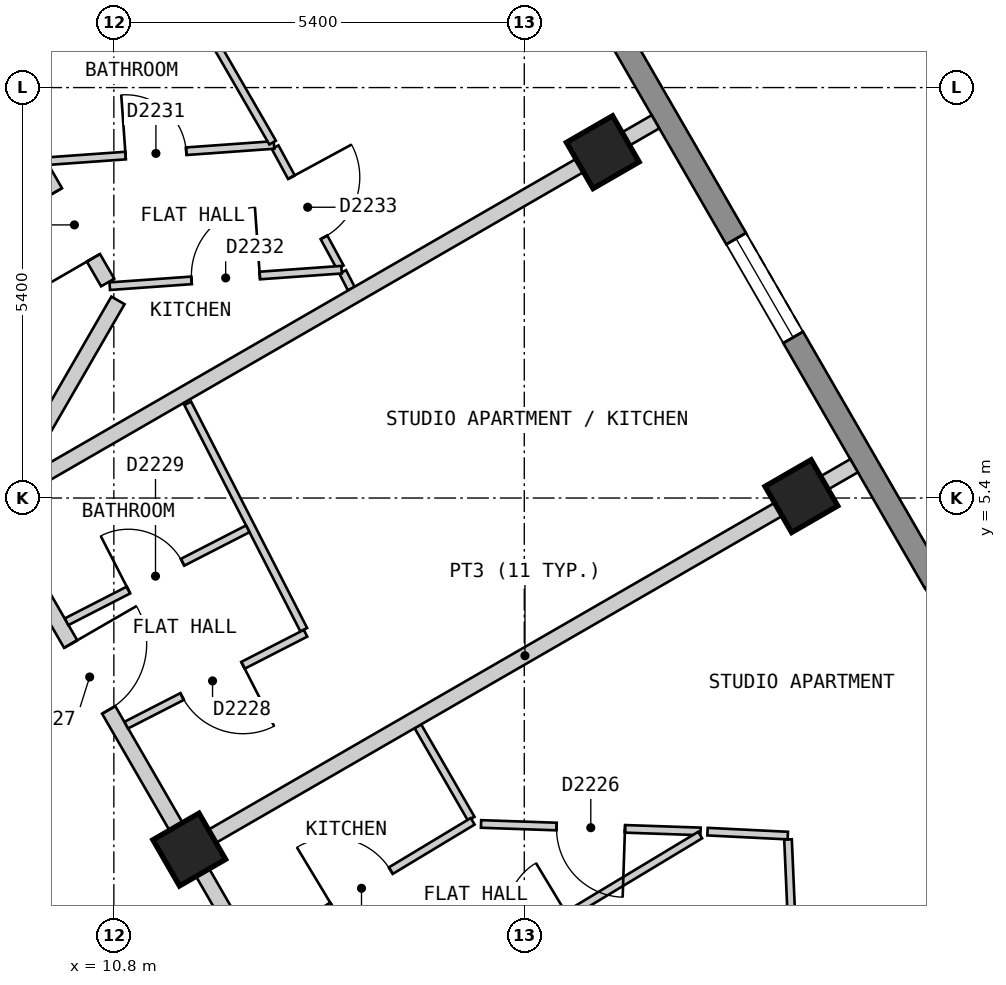
"""IFC4 building model, lengths in metres.
Left out: names, types, materials, properties, quantities, classifications, styles, units other than length and angle.
Written with IfcOpenShell. Run it as: python <this file> out.ifc"""

import sys

from ifc_helpers import new_model, si_unit, direction, frame, frame_2d, origin, origin_2d, place, context, subcontext, project, spatial, polyline, rectangle, outline, extrude, element, fill, save


model = new_model("IFC4")
c1 = context("Model", 3, precision=1e-05, world=origin(), true_north=direction((0.0, 1.0)))
c2 = subcontext(c1, "Body", "Model", "MODEL_VIEW")
j1 = project(units=[si_unit("LENGTHUNIT", "METRE"), si_unit("PLANEANGLEUNIT", "RADIAN")], contexts=[c1])
p1 = place(None, origin())
s1 = spatial("IfcSite", under=j1, at=p1, CompositionType="ELEMENT")
p2 = place(p1, origin())
s2 = spatial("IfcBuilding", under=s1, at=p2, CompositionType="ELEMENT")
p3 = place(p2, frame((0.0, 0.0, 235.8)))
s3 = spatial("IfcBuildingStorey", under=s2, at=p3, CompositionType="ELEMENT", Elevation=235.8)
for number, where, z_axis, x_axis in (
    (1, (19.846, 5.425, 0.0), (0.0, 0.0, 1.0), (-0.5, 0.866, 0.0)),
    (2, (17.233, 9.95, 0.0), (0.0, 0.0, 1.0), (-0.5, 0.866, 0.0)),
    (3, (11.792, 0.775, 0.0), (0.0, 0.0, 1.0), (-0.5, 0.866, 0.0)),
):
    element("IfcColumn", number, at=place(p3, frame(where, z_axis=z_axis, x_axis=x_axis)), inside=s3, PredefinedType="COLUMN", context=c2, shape_type="SweptSolid", body=[
        extrude(rectangle(XDim=0.7, YDim=0.7, at=origin_2d()), origin(), (0.0, 0.0, 1.0), 3.0),
    ])
p4 = place(p3, frame((23.599, 0.825, 0.0), z_axis=(0.0, 0.0, 1.0), x_axis=(-0.500003656944, 0.866023292436, 0.0)))
e4 = element("IfcWall", 4, at=p4, inside=s3, PredefinedType="SOLIDWALL", context=c2, shape_type="SweptSolid", body=[
    extrude(outline(polyline([(0.0, -0.15), (22.17, -0.15), (22.09, 0.15), (0.08, 0.15), (0.0, -0.15)])), origin(), (0.0, 0.0, 1.0), 2.7),
])
p5 = place(p4, frame((2.497, 0.0, 0.15)))
e5 = element("IfcOpeningElement", 5, at=p5, cuts=e4, PredefinedType="OPENING", context=c2, shape_type="SweptSolid", body=[
    extrude(rectangle(XDim=1.5, YDim=2.1, at=frame_2d((0.75, 1.05))), frame((0.0, 0.16, 0.0), z_axis=(0.0, -1.0, 0.0), x_axis=(1.0, 0.0, 0.0)), (0.0, 0.0, 1.0), 0.32),
])
p6 = place(p4, frame((7.723, 0.0, 0.15)))
e6 = element("IfcOpeningElement", 6, at=p6, cuts=e4, PredefinedType="OPENING", context=c2, shape_type="SweptSolid", body=[
    extrude(rectangle(XDim=1.5, YDim=2.1, at=frame_2d((0.75, 1.05))), frame((0.0, 0.16, 0.0), z_axis=(0.0, -1.0, 0.0), x_axis=(1.0, 0.0, 0.0)), (0.0, 0.0, 1.0), 0.32),
])
p7 = place(p4, frame((12.948, 0.0, 0.15)))
e7 = element("IfcOpeningElement", 7, at=p7, cuts=e4, PredefinedType="OPENING", context=c2, shape_type="SweptSolid", body=[
    extrude(rectangle(XDim=1.5, YDim=2.1, at=frame_2d((0.75, 1.05))), frame((0.0, 0.16, 0.0), z_axis=(0.0, -1.0, 0.0), x_axis=(1.0, 0.0, 0.0)), (0.0, 0.0, 1.0), 0.32),
])
p8 = place(p4, frame((18.173, 0.0, 0.15)))
e8 = element("IfcOpeningElement", 8, at=p8, cuts=e4, PredefinedType="OPENING", context=c2, shape_type="SweptSolid", body=[
    extrude(rectangle(XDim=1.5, YDim=2.1, at=frame_2d((0.75, 1.05))), frame((0.0, 0.16, 0.0), z_axis=(0.0, -1.0, 0.0), x_axis=(1.0, 0.0, 0.0)), (0.0, 0.0, 1.0), 0.32),
])
p9 = place(p3, frame((9.238, 5.2, 0.0), z_axis=(0.0, 0.0, 1.0), x_axis=(0.500025705601, -0.86601056214, 0.0)))
e9 = element("IfcWall", 9, at=p9, inside=s3, PredefinedType="PARTITIONING", context=c2, shape_type="SweptSolid", body=[
    extrude(rectangle(XDim=7.735, YDim=0.2, at=frame_2d((3.868, 0.0))), origin(), (0.0, 0.0, 1.0), 2.7),
])
p10 = place(p9, frame((6.898, 0.0, 0.0)))
e10 = element("IfcOpeningElement", 10, at=p10, cuts=e9, PredefinedType="OPENING", context=c2, shape_type="SweptSolid", body=[
    extrude(rectangle(XDim=0.8, YDim=2.1, at=frame_2d((0.4, 1.05))), frame((0.0, 0.11, 0.0), z_axis=(0.0, -1.0, 0.0), x_axis=(1.0, 0.0, 0.0)), (0.0, 0.0, 1.0), 0.22),
])
p11 = place(p9, frame((1.988, 0.0, 0.0)))
e11 = element("IfcOpeningElement", 11, at=p11, cuts=e9, PredefinedType="OPENING", context=c2, shape_type="SweptSolid", body=[
    extrude(rectangle(XDim=1.0, YDim=2.1, at=frame_2d((0.5, 1.05))), frame((0.0, 0.11, 0.0), z_axis=(0.0, -1.0, 0.0), x_axis=(1.0, 0.0, 0.0)), (0.0, 0.0, 1.0), 0.22),
])
p12 = place(p3, frame((5.485, 17.3, 0.0), z_axis=(0.0, 0.0, 1.0), x_axis=(0.500017221754, -0.866015460572, 0.0)))
e12 = element("IfcWall", 12, at=p12, inside=s3, PredefinedType="PARTITIONING", context=c2, shape_type="SweptSolid", body=[
    extrude(rectangle(XDim=10.468, YDim=0.2, at=frame_2d((5.234, 0.0))), origin(), (0.0, 0.0, 1.0), 2.7),
])
p13 = place(p12, frame((9.092, 0.0, 0.0)))
e13 = element("IfcOpeningElement", 13, at=p13, cuts=e12, PredefinedType="OPENING", context=c2, shape_type="SweptSolid", body=[
    extrude(rectangle(XDim=1.0, YDim=2.1, at=frame_2d((0.5, 1.05))), frame((0.0, 0.11, 0.0), z_axis=(0.0, -1.0, 0.0), x_axis=(1.0, 0.0, 0.0)), (0.0, 0.0, 1.0), 0.22),
])
p14 = place(p3, frame((9.354, 5.401, 0.0), z_axis=(0.0, 0.0, 1.0), x_axis=(0.499849222119, 0.866112437936, 0.0)))
e14 = element("IfcWall", 14, at=p14, inside=s3, PredefinedType="PARTITIONING", context=c2, shape_type="SweptSolid", body=[
    extrude(rectangle(XDim=3.001, YDim=0.2, at=frame_2d((1.5, 0.0))), origin(), (0.0, 0.0, 1.0), 2.7),
])
p15 = place(p3, frame((14.8, 2.397, 0.0), z_axis=(0.0, 0.0, 1.0), x_axis=(0.49989805765, -0.866084252228, 0.0)))
e15 = element("IfcWall", 15, at=p15, inside=s3, PredefinedType="PARTITIONING", context=c2, shape_type="SweptSolid", body=[
    extrude(rectangle(XDim=1.404, YDim=0.1, at=frame_2d((0.702, 0.0))), origin(), (0.0, 0.0, 1.0), 2.7),
])
p16 = place(p3, frame((12.922, 10.016, 0.0), z_axis=(0.0, 0.0, 1.0), x_axis=(0.476510550025, -0.879168752695, 0.0)))
e16 = element("IfcWall", 16, at=p16, inside=s3, PredefinedType="PARTITIONING", context=c2, shape_type="SweptSolid", body=[
    extrude(rectangle(XDim=1.798, YDim=0.1, at=frame_2d((0.899, 0.0))), origin(), (0.0, 0.0, 1.0), 2.7),
])
p17 = place(p16, frame((0.449, 0.0, 0.0)))
e17 = element("IfcOpeningElement", 17, at=p17, cuts=e16, PredefinedType="OPENING", context=c2, shape_type="SweptSolid", body=[
    extrude(rectangle(XDim=0.9, YDim=2.1, at=frame_2d((0.45, 1.05))), frame((0.0, 0.06, 0.0), z_axis=(0.0, -1.0, 0.0), x_axis=(1.0, 0.0, 0.0)), (0.0, 0.0, 1.0), 0.12),
])
p18 = place(p3, frame((13.811, 8.375, 0.0), z_axis=(0.0, 0.0, 1.0), x_axis=(0.457058020142, -0.889436881529, 0.0)))
e18 = element("IfcWall", 18, at=p18, inside=s3, PredefinedType="PARTITIONING", context=c2, shape_type="SweptSolid", body=[
    extrude(rectangle(XDim=0.247, YDim=0.1, at=frame_2d((0.124, 0.0))), origin(), (0.0, 0.0, 1.0), 2.7),
])
p19 = place(p3, frame((11.772, 6.646, 0.0), z_axis=(0.0, 0.0, 1.0), x_axis=(0.456175983405, -0.889889584254, 0.0)))
e19 = element("IfcWall", 19, at=p19, inside=s3, PredefinedType="PARTITIONING", context=c2, shape_type="SweptSolid", body=[
    extrude(rectangle(XDim=3.348, YDim=0.1, at=frame_2d((1.674, 0.0))), origin(), (0.0, 0.0, 1.0), 2.7),
])
p20 = place(p3, frame((19.67, 0.909, 0.0), z_axis=(0.0, 0.0, 1.0), x_axis=(0.043933486644, -0.99903445824, 0.0)))
e20 = element("IfcWall", 20, at=p20, inside=s3, PredefinedType="PARTITIONING", context=c2, shape_type="SweptSolid", body=[
    extrude(rectangle(XDim=3.373, YDim=0.1, at=frame_2d((1.687, 0.0))), origin(), (0.0, 0.0, 1.0), 2.7),
])
p21 = place(p3, frame((15.631, 1.112, 0.0), z_axis=(0.0, 0.0, 1.0), x_axis=(0.999423034213, -0.033964668168, 0.0)))
e21 = element("IfcWall", 21, at=p21, inside=s3, PredefinedType="PARTITIONING", context=c2, shape_type="SweptSolid", body=[
    extrude(rectangle(XDim=2.89, YDim=0.1, at=frame_2d((1.445, 0.0))), origin(), (0.0, 0.0, 1.0), 2.7),
])
p22 = place(p21, frame((0.995, 0.0, 0.0)))
e22 = element("IfcOpeningElement", 22, at=p22, cuts=e21, PredefinedType="OPENING", context=c2, shape_type="SweptSolid", body=[
    extrude(rectangle(XDim=0.9, YDim=2.1, at=frame_2d((0.45, 1.05))), frame((0.0, 0.06, 0.0), z_axis=(0.0, -1.0, 0.0), x_axis=(1.0, 0.0, 0.0)), (0.0, 0.0, 1.0), 0.12),
])
p23 = place(p3, frame((10.178, 3.772, 0.0), z_axis=(0.0, 0.0, 1.0), x_axis=(0.889732071959, 0.456483121405, 0.0)))
e23 = element("IfcWall", 23, at=p23, inside=s3, PredefinedType="PARTITIONING", context=c2, shape_type="SweptSolid", body=[
    extrude(rectangle(XDim=2.679, YDim=0.1, at=frame_2d((1.34, 0.0))), origin(), (0.0, 0.0, 1.0), 2.7),
])
p24 = place(p23, frame((0.915, 0.0, 0.0)))
e24 = element("IfcOpeningElement", 24, at=p24, cuts=e23, PredefinedType="OPENING", context=c2, shape_type="SweptSolid", body=[
    extrude(rectangle(XDim=0.8, YDim=2.1, at=frame_2d((0.4, 1.05))), frame((0.0, 0.06, 0.0), z_axis=(0.0, -1.0, 0.0), x_axis=(1.0, 0.0, 0.0)), (0.0, 0.0, 1.0), 0.12),
])
p25 = place(p3, frame((10.963, 2.412, 0.0), z_axis=(0.0, 0.0, 1.0), x_axis=(0.889943997558, 0.456069820543, 0.0)))
e25 = element("IfcWall", 25, at=p25, inside=s3, PredefinedType="PARTITIONING", context=c2, shape_type="SweptSolid", body=[
    extrude(rectangle(XDim=2.651, YDim=0.1, at=frame_2d((1.325, 0.0))), origin(), (0.0, 0.0, 1.0), 2.7),
])
p26 = place(p25, frame((0.826, 0.0, 0.0)))
e26 = element("IfcOpeningElement", 26, at=p26, cuts=e25, PredefinedType="OPENING", context=c2, shape_type="SweptSolid", body=[
    extrude(rectangle(XDim=0.9, YDim=2.1, at=frame_2d((0.45, 1.05))), frame((0.0, 0.06, 0.0), z_axis=(0.0, -1.0, 0.0), x_axis=(1.0, 0.0, 0.0)), (0.0, 0.0, 1.0), 0.12),
])
p27 = place(p3, frame((12.681, -0.564, 0.0), z_axis=(0.0, 0.0, 1.0), x_axis=(0.856575482301, 0.516021746752, 0.0)))
e27 = element("IfcWall", 27, at=p27, inside=s3, PredefinedType="PARTITIONING", context=c2, shape_type="SweptSolid", body=[
    extrude(rectangle(XDim=3.316, YDim=0.1, at=frame_2d((1.658, 0.0))), origin(), (0.0, 0.0, 1.0), 2.7),
])
p28 = place(p27, frame((1.158, 0.0, 0.0)))
e28 = element("IfcOpeningElement", 28, at=p28, cuts=e27, PredefinedType="OPENING", context=c2, shape_type="SweptSolid", body=[
    extrude(rectangle(XDim=0.9, YDim=2.1, at=frame_2d((0.45, 1.05))), frame((0.0, 0.06, 0.0), z_axis=(0.0, -1.0, 0.0), x_axis=(1.0, 0.0, 0.0)), (0.0, 0.0, 1.0), 0.12),
])
p29 = place(p3, frame((14.423, -1.499, 0.0), z_axis=(0.0, 0.0, 1.0), x_axis=(0.856512638305, 0.516126050905, 0.0)))
e29 = element("IfcWall", 29, at=p29, inside=s3, PredefinedType="PARTITIONING", context=c2, shape_type="SweptSolid", body=[
    extrude(rectangle(XDim=4.776, YDim=0.1, at=frame_2d((2.388, 0.0))), origin(), (0.0, 0.0, 1.0), 2.7),
])
p30 = place(p29, frame((1.936, 0.0, 0.0)))
e30 = element("IfcOpeningElement", 30, at=p30, cuts=e29, PredefinedType="OPENING", context=c2, shape_type="SweptSolid", body=[
    extrude(rectangle(XDim=0.8, YDim=2.1, at=frame_2d((0.4, 1.05))), frame((0.0, 0.06, 0.0), z_axis=(0.0, -1.0, 0.0), x_axis=(1.0, 0.0, 0.0)), (0.0, 0.0, 1.0), 0.12),
])
p31 = place(p3, frame((10.746, 8.187, 0.0), z_axis=(0.0, 0.0, 1.0), x_axis=(0.997477310687, 0.070986017387, 0.0)))
e31 = element("IfcWall", 31, at=p31, inside=s3, PredefinedType="PARTITIONING", context=c2, shape_type="SweptSolid", body=[
    extrude(rectangle(XDim=3.058, YDim=0.1, at=frame_2d((1.529, 0.0))), origin(), (0.0, 0.0, 1.0), 2.7),
])
p32 = place(p31, frame((1.079, 0.0, 0.0)))
e32 = element("IfcOpeningElement", 32, at=p32, cuts=e31, PredefinedType="OPENING", context=c2, shape_type="SweptSolid", body=[
    extrude(rectangle(XDim=0.9, YDim=2.1, at=frame_2d((0.45, 1.05))), frame((0.0, 0.06, 0.0), z_axis=(0.0, -1.0, 0.0), x_axis=(1.0, 0.0, 0.0)), (0.0, 0.0, 1.0), 0.12),
])
p33 = place(p3, frame((9.912, 9.831, 0.0), z_axis=(0.0, 0.0, 1.0), x_axis=(0.997459937941, 0.071229714326, 0.0)))
e33 = element("IfcWall", 33, at=p33, inside=s3, PredefinedType="PARTITIONING", context=c2, shape_type="SweptSolid", body=[
    extrude(rectangle(XDim=3.002, YDim=0.1, at=frame_2d((1.501, 0.0))), origin(), (0.0, 0.0, 1.0), 2.7),
])
p34 = place(p33, frame((1.045, 0.0, 0.0)))
e34 = element("IfcOpeningElement", 34, at=p34, cuts=e33, PredefinedType="OPENING", context=c2, shape_type="SweptSolid", body=[
    extrude(rectangle(XDim=0.8, YDim=2.1, at=frame_2d((0.4, 1.05))), frame((0.0, 0.06, 0.0), z_axis=(0.0, -1.0, 0.0), x_axis=(1.0, 0.0, 0.0)), (0.0, 0.0, 1.0), 0.12),
])
p35 = place(p3, frame((11.879, 0.826, 0.0), z_axis=(0.0, 0.0, 1.0), x_axis=(0.866065245018, 0.499930986609, 0.0)))
e35 = element("IfcWall", 35, at=p35, inside=s3, PredefinedType="PARTITIONING", context=c2, shape_type="SweptSolid", body=[
    extrude(rectangle(XDim=10.0, YDim=0.2, at=frame_2d((5.0, 0.0))), origin(), (0.0, 0.0, 1.0), 2.7),
])
p36 = place(p3, frame((9.457, 5.461, 0.0), z_axis=(0.0, 0.0, 1.0), x_axis=(0.866043818878, 0.499968102766, 0.0)))
e36 = element("IfcWall", 36, at=p36, inside=s3, PredefinedType="PARTITIONING", context=c2, shape_type="SweptSolid", body=[
    extrude(rectangle(XDim=9.779, YDim=0.2, at=frame_2d((4.89, 0.0))), origin(), (0.0, 0.0, 1.0), 2.7),
])
p37 = place(p3, frame((9.079, 11.275, 0.0), z_axis=(0.0, 0.0, 1.0), x_axis=(0.866001485781, 0.500041424909, 0.0)))
e37 = element("IfcWall", 37, at=p37, inside=s3, PredefinedType="PARTITIONING", context=c2, shape_type="SweptSolid", body=[
    extrude(rectangle(XDim=7.2, YDim=0.2, at=frame_2d((3.6, 0.0))), origin(), (0.0, 0.0, 1.0), 2.7),
])
p38 = place(p3, frame((18.611, 1.011, 0.0), z_axis=(0.0, 0.0, 1.0), x_axis=(0.998789491469, -0.049188939117, 0.0)))
e38 = element("IfcWall", 38, at=p38, inside=s3, PredefinedType="PARTITIONING", context=c2, shape_type="SweptSolid", body=[
    extrude(rectangle(XDim=1.057, YDim=0.1, at=frame_2d((0.529, 0.0))), origin(), (0.0, 0.0, 1.0), 2.7),
])
p39 = place(p3, frame((11.417, 12.625, 0.0), z_axis=(0.0, 0.0, 1.0), x_axis=(0.500055103712, -0.865993587304, 0.0)))
e39 = element("IfcWall", 39, at=p39, inside=s3, PredefinedType="PARTITIONING", context=c2, shape_type="SweptSolid", body=[
    extrude(rectangle(XDim=2.944, YDim=0.1, at=frame_2d((1.472, 0.0))), origin(), (0.0, 0.0, 1.0), 2.7),
])
p40 = place(p6, origin())
e40 = element("IfcWindow", 40, at=p40, inside=s3, PartitioningType="SINGLE_PANEL", PredefinedType="WINDOW", context=c2, shape_type="SweptSolid", body=[
    extrude(rectangle(XDim=1.5, YDim=2.1, at=frame_2d((0.75, 1.05))), frame((0.0, 0.03, 0.0), z_axis=(0.0, -1.0, 0.0), x_axis=(1.0, 0.0, 0.0)), (0.0, 0.0, 1.0), 0.06),
])
fill(e6, e40)
p41 = place(p28, origin())
e41 = element("IfcDoor", 41, at=p41, inside=s3, OperationType="SINGLE_SWING_LEFT", PredefinedType="DOOR", context=c2, shape_type="SweptSolid", body=[
    extrude(rectangle(XDim=0.9, YDim=2.1, at=frame_2d((0.45, 1.05))), frame((0.0, 0.025, 0.0), z_axis=(0.0, -1.0, 0.0), x_axis=(1.0, 0.0, 0.0)), (0.0, 0.0, 1.0), 0.05),
])
fill(e28, e41)
p42 = place(p22, origin())
e42 = element("IfcDoor", 42, at=p42, inside=s3, OperationType="SINGLE_SWING_RIGHT", PredefinedType="DOOR", context=c2, shape_type="SweptSolid", body=[
    extrude(rectangle(XDim=0.9, YDim=2.1, at=frame_2d((0.45, 1.05))), frame((0.0, 0.025, 0.0), z_axis=(0.0, -1.0, 0.0), x_axis=(1.0, 0.0, 0.0)), (0.0, 0.0, 1.0), 0.05),
])
fill(e22, e42)
p43 = place(p11, origin())
e43 = element("IfcDoor", 43, at=p43, inside=s3, OperationType="SINGLE_SWING_LEFT", PredefinedType="DOOR", context=c2, shape_type="SweptSolid", body=[
    extrude(rectangle(XDim=1.0, YDim=2.1, at=frame_2d((0.5, 1.05))), frame((0.0, 0.025, 0.0), z_axis=(0.0, -1.0, 0.0), x_axis=(1.0, 0.0, 0.0)), (0.0, 0.0, 1.0), 0.05),
])
fill(e11, e43)
p44 = place(p26, origin())
e44 = element("IfcDoor", 44, at=p44, inside=s3, OperationType="SINGLE_SWING_RIGHT", PredefinedType="DOOR", context=c2, shape_type="SweptSolid", body=[
    extrude(rectangle(XDim=0.9, YDim=2.1, at=frame_2d((0.45, 1.05))), frame((0.0, 0.025, 0.0), z_axis=(0.0, -1.0, 0.0), x_axis=(1.0, 0.0, 0.0)), (0.0, 0.0, 1.0), 0.05),
])
fill(e26, e44)
p45 = place(p24, origin())
e45 = element("IfcDoor", 45, at=p45, inside=s3, OperationType="SINGLE_SWING_LEFT", PredefinedType="DOOR", context=c2, shape_type="SweptSolid", body=[
    extrude(rectangle(XDim=0.8, YDim=2.1, at=frame_2d((0.4, 1.05))), frame((0.0, 0.025, 0.0), z_axis=(0.0, -1.0, 0.0), x_axis=(1.0, 0.0, 0.0)), (0.0, 0.0, 1.0), 0.05),
])
fill(e24, e45)
p46 = place(p13, origin())
e46 = element("IfcDoor", 46, at=p46, inside=s3, OperationType="SINGLE_SWING_RIGHT", PredefinedType="DOOR", context=c2, shape_type="SweptSolid", body=[
    extrude(rectangle(XDim=1.0, YDim=2.1, at=frame_2d((0.5, 1.05))), frame((0.0, 0.025, 0.0), z_axis=(0.0, -1.0, 0.0), x_axis=(1.0, 0.0, 0.0)), (0.0, 0.0, 1.0), 0.05),
])
fill(e13, e46)
p47 = place(p34, origin())
e47 = element("IfcDoor", 47, at=p47, inside=s3, OperationType="SINGLE_SWING_LEFT", PredefinedType="DOOR", context=c2, shape_type="SweptSolid", body=[
    extrude(rectangle(XDim=0.8, YDim=2.1, at=frame_2d((0.4, 1.05))), frame((0.0, 0.025, 0.0), z_axis=(0.0, -1.0, 0.0), x_axis=(1.0, 0.0, 0.0)), (0.0, 0.0, 1.0), 0.05),
])
fill(e34, e47)
p48 = place(p32, origin())
e48 = element("IfcDoor", 48, at=p48, inside=s3, OperationType="SINGLE_SWING_RIGHT", PredefinedType="DOOR", context=c2, shape_type="SweptSolid", body=[
    extrude(rectangle(XDim=0.9, YDim=2.1, at=frame_2d((0.45, 1.05))), frame((0.0, 0.025, 0.0), z_axis=(0.0, -1.0, 0.0), x_axis=(1.0, 0.0, 0.0)), (0.0, 0.0, 1.0), 0.05),
])
fill(e32, e48)
p49 = place(p17, origin())
e49 = element("IfcDoor", 49, at=p49, inside=s3, OperationType="SINGLE_SWING_LEFT", PredefinedType="DOOR", context=c2, shape_type="SweptSolid", body=[
    extrude(rectangle(XDim=0.9, YDim=2.1, at=frame_2d((0.45, 1.05))), frame((0.0, 0.025, 0.0), z_axis=(0.0, -1.0, 0.0), x_axis=(1.0, 0.0, 0.0)), (0.0, 0.0, 1.0), 0.05),
])
fill(e17, e49)
save(model, sys.argv[1])
